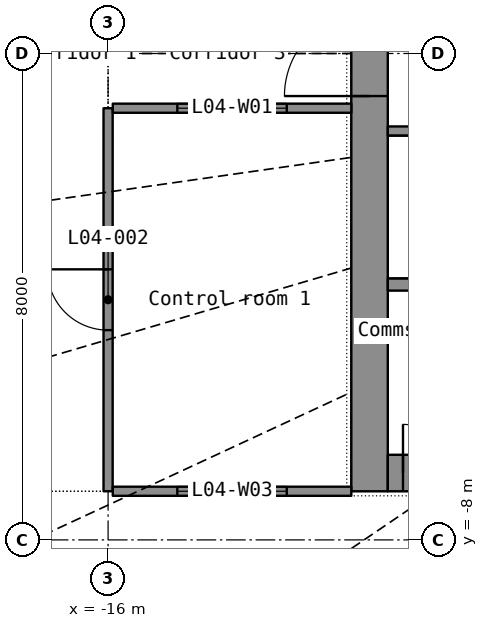
"""IFC4 building model, lengths in metres.
Left out: names, types, materials, properties, quantities, classifications, styles, units other than length and angle.
Written with IfcOpenShell. Run it as: python <this file> out.ifc"""

import sys

from ifc_helpers import new_model, si_unit, direction, frame, frame_2d, origin, place, context, subcontext, project, spatial, rectangle, extrude, element, fill, save


model = new_model("IFC4")
c1 = context("Model", 3, precision=1e-05, world=origin(), true_north=direction((0.0, 1.0)))
c2 = subcontext(c1, "Body", "Model", "MODEL_VIEW")
j1 = project(units=[si_unit("LENGTHUNIT", "METRE"), si_unit("PLANEANGLEUNIT", "RADIAN")], contexts=[c1])
p1 = place(None, origin())
s1 = spatial("IfcSite", under=j1, at=p1, CompositionType="ELEMENT")
p2 = place(p1, origin())
s2 = spatial("IfcBuilding", under=s1, at=p2, CompositionType="ELEMENT")
p3 = place(p2, frame((0.0, 0.0, 24.5)))
s3 = spatial("IfcBuildingStorey", under=s2, at=p3, CompositionType="ELEMENT", Elevation=24.5)
p4 = place(p3, frame((-11.7, -7.2, 0.0), z_axis=(0.0, 0.0, 1.0), x_axis=(0.0, 1.0, 0.0)))
e1 = element("IfcWall", 1, at=p4, inside=s3, PredefinedType="SHEAR", context=c2, shape_type="SweptSolid", body=[
    extrude(rectangle(XDim=14.4, YDim=0.6, at=frame_2d((7.2, 0.0))), origin(), (0.0, 0.0, 1.0), 3.8),
])
p5 = place(p4, frame((6.5, 0.0, 0.0)))
e2 = element("IfcOpeningElement", 2, at=p5, cuts=e1, PredefinedType="OPENING", context=c2, shape_type="SweptSolid", body=[
    extrude(rectangle(XDim=1.4, YDim=2.2, at=frame_2d((0.7, 1.1))), frame((0.0, 0.31, 0.0), z_axis=(0.0, -1.0, 0.0), x_axis=(1.0, 0.0, 0.0)), (0.0, 0.0, 1.0), 0.62),
])
p6 = place(p3, frame((-11.4, -6.9, 0.0), z_axis=(0.0, 0.0, 1.0), x_axis=(1.0, 0.0, 0.0)))
e3 = element("IfcWall", 3, at=p6, inside=s3, PredefinedType="SHEAR", context=c2, shape_type="SweptSolid", body=[
    extrude(rectangle(XDim=22.8, YDim=0.6, at=frame_2d((11.4, 0.0))), origin(), (0.0, 0.0, 1.0), 3.8),
])
p7 = place(p6, frame((1.85, 0.0, 0.0)))
e4 = element("IfcOpeningElement", 4, at=p7, cuts=e3, PredefinedType="OPENING", context=c2, shape_type="SweptSolid", body=[
    extrude(rectangle(XDim=1.1, YDim=2.2, at=frame_2d((0.55, 1.1))), frame((0.0, 0.31, 0.0), z_axis=(0.0, -1.0, 0.0), x_axis=(1.0, 0.0, 0.0)), (0.0, 0.0, 1.0), 0.62),
])
p8 = place(p6, frame((3.85, 0.0, 0.0)))
e5 = element("IfcOpeningElement", 5, at=p8, cuts=e3, PredefinedType="OPENING", context=c2, shape_type="SweptSolid", body=[
    extrude(rectangle(XDim=1.1, YDim=2.2, at=frame_2d((0.55, 1.1))), frame((0.0, 0.31, 0.0), z_axis=(0.0, -1.0, 0.0), x_axis=(1.0, 0.0, 0.0)), (0.0, 0.0, 1.0), 0.62),
])
p9 = place(p6, frame((5.85, 0.0, 0.0)))
e6 = element("IfcOpeningElement", 6, at=p9, cuts=e3, PredefinedType="OPENING", context=c2, shape_type="SweptSolid", body=[
    extrude(rectangle(XDim=1.1, YDim=2.2, at=frame_2d((0.55, 1.1))), frame((0.0, 0.31, 0.0), z_axis=(0.0, -1.0, 0.0), x_axis=(1.0, 0.0, 0.0)), (0.0, 0.0, 1.0), 0.62),
])
p10 = place(p6, frame((7.85, 0.0, 0.0)))
e7 = element("IfcOpeningElement", 7, at=p10, cuts=e3, PredefinedType="OPENING", context=c2, shape_type="SweptSolid", body=[
    extrude(rectangle(XDim=1.1, YDim=2.2, at=frame_2d((0.55, 1.1))), frame((0.0, 0.31, 0.0), z_axis=(0.0, -1.0, 0.0), x_axis=(1.0, 0.0, 0.0)), (0.0, 0.0, 1.0), 0.62),
])
p11 = place(p6, frame((9.85, 0.0, 0.0)))
e8 = element("IfcOpeningElement", 8, at=p11, cuts=e3, PredefinedType="OPENING", context=c2, shape_type="SweptSolid", body=[
    extrude(rectangle(XDim=1.1, YDim=2.2, at=frame_2d((0.55, 1.1))), frame((0.0, 0.31, 0.0), z_axis=(0.0, -1.0, 0.0), x_axis=(1.0, 0.0, 0.0)), (0.0, 0.0, 1.0), 0.62),
])
p12 = place(p6, frame((11.85, 0.0, 0.0)))
e9 = element("IfcOpeningElement", 9, at=p12, cuts=e3, PredefinedType="OPENING", context=c2, shape_type="SweptSolid", body=[
    extrude(rectangle(XDim=1.1, YDim=2.2, at=frame_2d((0.55, 1.1))), frame((0.0, 0.31, 0.0), z_axis=(0.0, -1.0, 0.0), x_axis=(1.0, 0.0, 0.0)), (0.0, 0.0, 1.0), 0.62),
])
p13 = place(p6, frame((13.85, 0.0, 0.0)))
e10 = element("IfcOpeningElement", 10, at=p13, cuts=e3, PredefinedType="OPENING", context=c2, shape_type="SweptSolid", body=[
    extrude(rectangle(XDim=1.1, YDim=2.2, at=frame_2d((0.55, 1.1))), frame((0.0, 0.31, 0.0), z_axis=(0.0, -1.0, 0.0), x_axis=(1.0, 0.0, 0.0)), (0.0, 0.0, 1.0), 0.62),
])
p14 = place(p6, frame((15.85, 0.0, 0.0)))
e11 = element("IfcOpeningElement", 11, at=p14, cuts=e3, PredefinedType="OPENING", context=c2, shape_type="SweptSolid", body=[
    extrude(rectangle(XDim=1.1, YDim=2.2, at=frame_2d((0.55, 1.1))), frame((0.0, 0.31, 0.0), z_axis=(0.0, -1.0, 0.0), x_axis=(1.0, 0.0, 0.0)), (0.0, 0.0, 1.0), 0.62),
])
p15 = place(p6, frame((19.85, 0.0, 0.0)))
e12 = element("IfcOpeningElement", 12, at=p15, cuts=e3, PredefinedType="OPENING", context=c2, shape_type="SweptSolid", body=[
    extrude(rectangle(XDim=1.1, YDim=2.2, at=frame_2d((0.55, 1.1))), frame((0.0, 0.31, 0.0), z_axis=(0.0, -1.0, 0.0), x_axis=(1.0, 0.0, 0.0)), (0.0, 0.0, 1.0), 0.62),
])
p16 = place(p6, frame((0.25, 0.0, 0.0)))
e13 = element("IfcOpeningElement", 13, at=p16, cuts=e3, PredefinedType="OPENING", context=c2, shape_type="SweptSolid", body=[
    extrude(rectangle(XDim=0.8, YDim=2.05, at=frame_2d((0.4, 1.025))), frame((0.0, 0.31, 0.0), z_axis=(0.0, -1.0, 0.0), x_axis=(1.0, 0.0, 0.0)), (0.0, 0.0, 1.0), 0.62),
])
p17 = place(p6, frame((21.75, 0.0, 0.0)))
e14 = element("IfcOpeningElement", 14, at=p17, cuts=e3, PredefinedType="OPENING", context=c2, shape_type="SweptSolid", body=[
    extrude(rectangle(XDim=0.8, YDim=2.05, at=frame_2d((0.4, 1.025))), frame((0.0, 0.31, 0.0), z_axis=(0.0, -1.0, 0.0), x_axis=(1.0, 0.0, 0.0)), (0.0, 0.0, 1.0), 0.62),
])
p18 = place(p3, frame((-11.4, -3.8, 0.0), z_axis=(0.0, 0.0, 1.0), x_axis=(1.0, 0.0, 0.0)))
e15 = element("IfcWall", 15, at=p18, inside=s3, PredefinedType="SHEAR", context=c2, shape_type="SweptSolid", body=[
    extrude(rectangle(XDim=22.8, YDim=0.2, at=frame_2d((11.4, 0.0))), origin(), (0.0, 0.0, 1.0), 3.8),
])
p19 = place(p3, frame((-11.4, -1.275, 0.0), z_axis=(0.0, 0.0, 1.0), x_axis=(1.0, 0.0, 0.0)))
e16 = element("IfcWall", 16, at=p19, inside=s3, PredefinedType="SHEAR", context=c2, shape_type="SweptSolid", body=[
    extrude(rectangle(XDim=8.4, YDim=0.15, at=frame_2d((4.2, 0.0))), origin(), (0.0, 0.0, 1.0), 3.8),
])
p20 = place(p19, frame((5.25, 0.0, 0.0)))
e17 = element("IfcOpeningElement", 17, at=p20, cuts=e16, PredefinedType="OPENING", context=c2, shape_type="SweptSolid", body=[
    extrude(rectangle(XDim=1.1, YDim=2.15, at=frame_2d((0.55, 1.075))), frame((0.0, 0.085, 0.0), z_axis=(0.0, -1.0, 0.0), x_axis=(1.0, 0.0, 0.0)), (0.0, 0.0, 1.0), 0.17),
])
p21 = place(p19, frame((7.05, 0.0, 0.0)))
e18 = element("IfcOpeningElement", 18, at=p21, cuts=e16, PredefinedType="OPENING", context=c2, shape_type="SweptSolid", body=[
    extrude(rectangle(XDim=0.9, YDim=2.1, at=frame_2d((0.45, 1.05))), frame((0.0, 0.085, 0.0), z_axis=(0.0, -1.0, 0.0), x_axis=(1.0, 0.0, 0.0)), (0.0, 0.0, 1.0), 0.17),
])
p22 = place(p3, frame((-16.0, -7.2, 0.0), z_axis=(0.0, 0.0, 1.0), x_axis=(0.0, 1.0, 0.0)))
e19 = element("IfcWall", 19, at=p22, inside=s3, PredefinedType="PARTITIONING", context=c2, shape_type="SweptSolid", body=[
    extrude(rectangle(XDim=6.3, YDim=0.15, at=frame_2d((3.15, 0.0))), origin(), (0.0, 0.0, 1.0), 2.8),
])
p23 = place(p22, frame((2.65, 0.0, 0.0)))
e20 = element("IfcOpeningElement", 20, at=p23, cuts=e19, PredefinedType="OPENING", context=c2, shape_type="SweptSolid", body=[
    extrude(rectangle(XDim=1.0, YDim=2.2, at=frame_2d((0.5, 1.1))), frame((0.0, 0.085, 0.0), z_axis=(0.0, -1.0, 0.0), x_axis=(1.0, 0.0, 0.0)), (0.0, 0.0, 1.0), 0.17),
])
p24 = place(p3, frame((-15.923, -0.9, 0.0), z_axis=(0.0, 0.0, 1.0), x_axis=(1.0, 0.0, 0.0)))
e21 = element("IfcWall", 21, at=p24, inside=s3, PredefinedType="PARTITIONING", context=c2, shape_type="SweptSolid", body=[
    extrude(rectangle(XDim=3.923, YDim=0.15, at=frame_2d((1.961, 0.0))), origin(), (0.0, 0.0, 1.0), 2.8),
])
p25 = place(p24, frame((1.062, 0.0, 1.0)))
e22 = element("IfcOpeningElement", 22, at=p25, cuts=e21, PredefinedType="OPENING", context=c2, shape_type="SweptSolid", body=[
    extrude(rectangle(XDim=1.8, YDim=1.2, at=frame_2d((0.9, 0.6))), frame((0.0, 0.085, 0.0), z_axis=(0.0, -1.0, 0.0), x_axis=(1.0, 0.0, 0.0)), (0.0, 0.0, 1.0), 0.17),
])
p26 = place(p3, frame((-12.0, -7.2, 0.0), z_axis=(0.0, 0.0, 1.0), x_axis=(-1.0, 0.0, 0.0)))
e23 = element("IfcWall", 23, at=p26, inside=s3, PredefinedType="PARTITIONING", context=c2, shape_type="SweptSolid", body=[
    extrude(rectangle(XDim=3.923, YDim=0.15, at=frame_2d((1.961, 0.0))), origin(), (0.0, 0.0, 1.0), 2.8),
])
p27 = place(p26, frame((1.062, 0.0, 1.0)))
e24 = element("IfcOpeningElement", 24, at=p27, cuts=e23, PredefinedType="OPENING", context=c2, shape_type="SweptSolid", body=[
    extrude(rectangle(XDim=1.8, YDim=1.2, at=frame_2d((0.9, 0.6))), frame((0.0, 0.085, 0.0), z_axis=(0.0, -1.0, 0.0), x_axis=(1.0, 0.0, 0.0)), (0.0, 0.0, 1.0), 0.17),
])
p28 = place(p16, origin())
e25 = element("IfcDoor", 25, at=p28, inside=s3, OperationType="SINGLE_SWING_LEFT", PredefinedType="DOOR", context=c2, shape_type="SweptSolid", body=[
    extrude(rectangle(XDim=0.8, YDim=2.05, at=frame_2d((0.4, 1.025))), frame((0.0, 0.025, 0.0), z_axis=(0.0, -1.0, 0.0), x_axis=(1.0, 0.0, 0.0)), (0.0, 0.0, 1.0), 0.05),
])
fill(e13, e25)
p29 = place(p5, origin())
e26 = element("IfcDoor", 26, at=p29, inside=s3, OperationType="DOUBLE_DOOR_SINGLE_SWING", PredefinedType="DOOR", context=c2, shape_type="SweptSolid", body=[
    extrude(rectangle(XDim=1.4, YDim=2.2, at=frame_2d((0.7, 1.1))), frame((0.0, 0.025, 0.0), z_axis=(0.0, -1.0, 0.0), x_axis=(1.0, 0.0, 0.0)), (0.0, 0.0, 1.0), 0.05),
])
fill(e2, e26)
p30 = place(p23, origin())
e27 = element("IfcDoor", 27, at=p30, inside=s3, OperationType="SINGLE_SWING_RIGHT", PredefinedType="DOOR", context=c2, shape_type="SweptSolid", body=[
    extrude(rectangle(XDim=1.0, YDim=2.2, at=frame_2d((0.5, 1.1))), frame((0.0, 0.025, 0.0), z_axis=(0.0, -1.0, 0.0), x_axis=(1.0, 0.0, 0.0)), (0.0, 0.0, 1.0), 0.05),
])
fill(e20, e27)
p31 = place(p25, origin())
e28 = element("IfcWindow", 28, at=p31, inside=s3, PartitioningType="SINGLE_PANEL", PredefinedType="WINDOW", context=c2, shape_type="SweptSolid", body=[
    extrude(rectangle(XDim=1.8, YDim=1.2, at=frame_2d((0.9, 0.6))), frame((0.0, 0.03, 0.0), z_axis=(0.0, -1.0, 0.0), x_axis=(1.0, 0.0, 0.0)), (0.0, 0.0, 1.0), 0.06),
])
fill(e22, e28)
p32 = place(p27, origin())
e29 = element("IfcWindow", 29, at=p32, inside=s3, PartitioningType="SINGLE_PANEL", PredefinedType="WINDOW", context=c2, shape_type="SweptSolid", body=[
    extrude(rectangle(XDim=1.8, YDim=1.2, at=frame_2d((0.9, 0.6))), frame((0.0, 0.03, 0.0), z_axis=(0.0, -1.0, 0.0), x_axis=(1.0, 0.0, 0.0)), (0.0, 0.0, 1.0), 0.06),
])
fill(e24, e29)
save(model, sys.argv[1])
